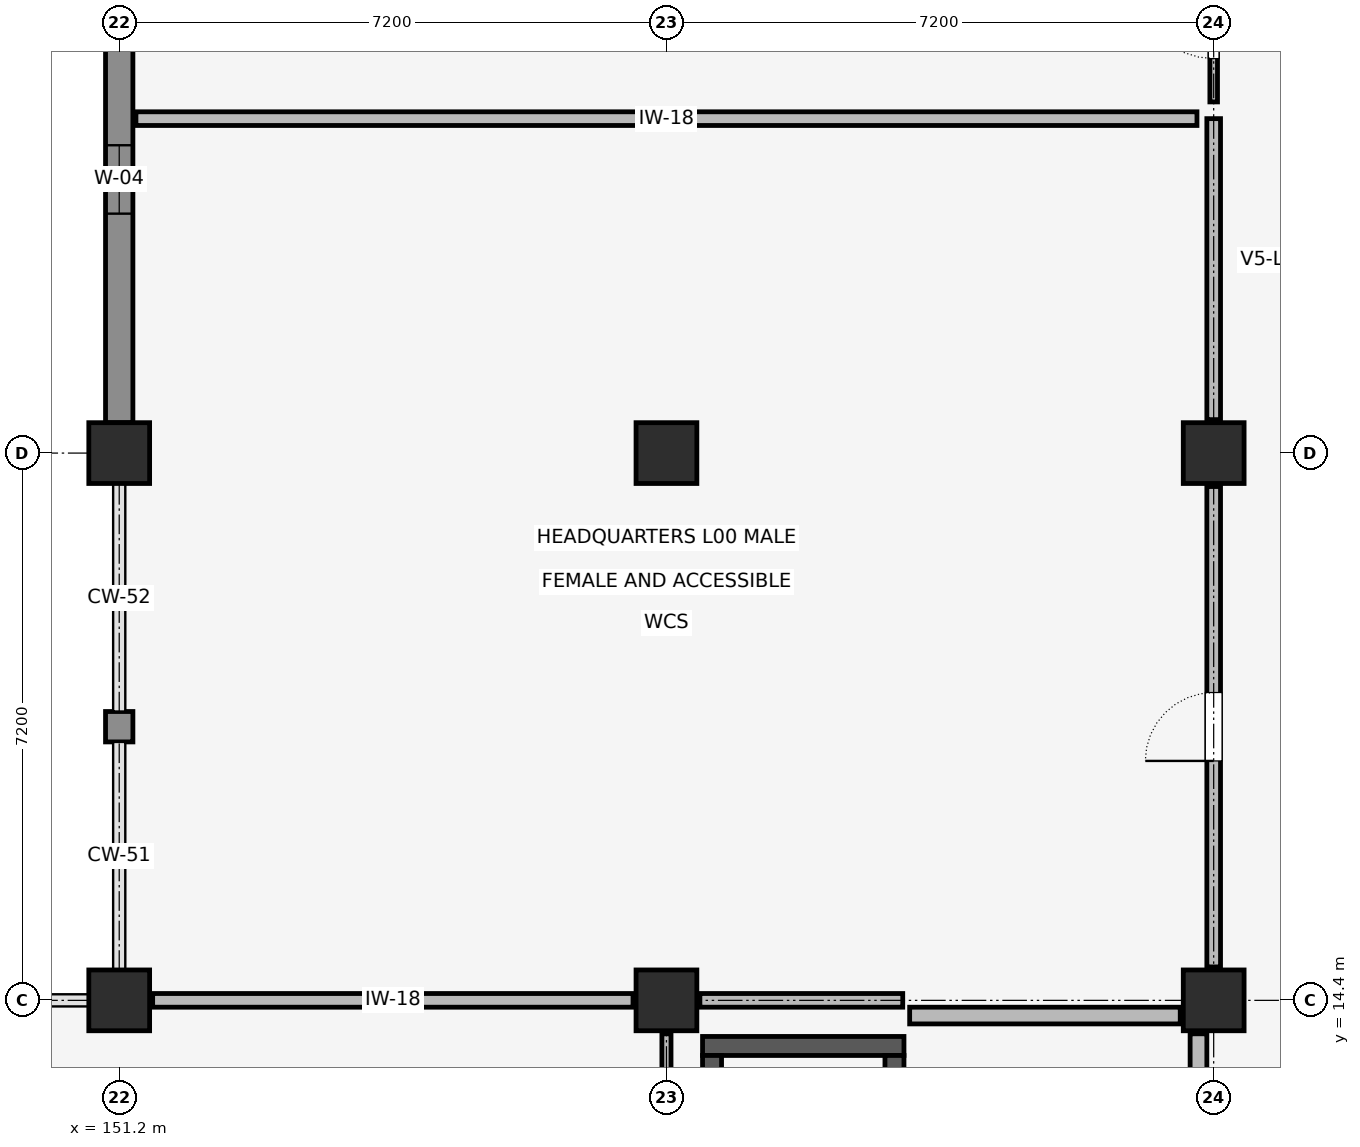
"""IFC4 building model, lengths in metres.
Left out: names, types, materials, properties, quantities, classifications, styles, units other than length and angle.
Written with IfcOpenShell. Run it as: python <this file> out.ifc"""

import sys

from ifc_helpers import new_model, si_unit, direction, frame, frame_2d, origin, origin_2d, place, context, subcontext, project, spatial, rectangle, extrude, element, fill, save


model = new_model("IFC4")
c1 = context("Model", 3, precision=1e-05, world=origin(), true_north=direction((0.0, 1.0)))
c2 = subcontext(c1, "Body", "Model", "MODEL_VIEW")
j1 = project(units=[si_unit("LENGTHUNIT", "METRE"), si_unit("PLANEANGLEUNIT", "RADIAN")], contexts=[c1])
p1 = place(None, origin())
s1 = spatial("IfcSite", under=j1, at=p1, CompositionType="ELEMENT")
p2 = place(p1, origin())
s2 = spatial("IfcBuilding", under=s1, at=p2, CompositionType="ELEMENT")
p3 = place(p2, origin())
s3 = spatial("IfcBuildingStorey", under=s2, at=p3, CompositionType="ELEMENT", Elevation=0.0)
for number, where, z_axis, x_axis in (
    (1, (151.2, 14.4, 0.0), (0.0, 0.0, 1.0), (1.0, 0.0, 0.0)),
    (2, (151.2, 21.6, 0.0), (0.0, 0.0, 1.0), (1.0, 0.0, 0.0)),
    (3, (158.4, 14.4, 0.0), (0.0, 0.0, 1.0), (1.0, 0.0, 0.0)),
    (4, (158.4, 21.6, 0.0), (0.0, 0.0, 1.0), (1.0, 0.0, 0.0)),
    (5, (165.6, 14.4, 0.0), (0.0, 0.0, 1.0), (1.0, 0.0, 0.0)),
    (6, (165.6, 21.6, 0.0), (0.0, 0.0, 1.0), (1.0, 0.0, 0.0)),
):
    element("IfcColumn", number, at=place(p3, frame(where, z_axis=z_axis, x_axis=x_axis)), inside=s3, PredefinedType="COLUMN", context=c2, shape_type="SweptSolid", body=[
        extrude(rectangle(XDim=0.8, YDim=0.8, at=origin_2d()), origin(), (0.0, 0.0, 1.0), 5.4),
    ])
p4 = place(p3, frame((158.875, 13.8, 0.0), z_axis=(0.0, 0.0, 1.0), x_axis=(1.0, 0.0, 0.0)))
e7 = element("IfcWall", 7, at=p4, inside=s3, PredefinedType="SHEAR", context=c2, shape_type="SweptSolid", body=[
    extrude(rectangle(XDim=2.65, YDim=0.25, at=frame_2d((1.325, 0.0))), origin(), (0.0, 0.0, 1.0), 5.15),
])
p5 = place(p3, frame((159.0, 10.925, 0.0), z_axis=(0.0, 0.0, 1.0), x_axis=(0.0, 1.0, 0.0)))
e8 = element("IfcWall", 8, at=p5, inside=s3, PredefinedType="SHEAR", context=c2, shape_type="SweptSolid", body=[
    extrude(rectangle(XDim=2.75, YDim=0.25, at=frame_2d((1.375, 0.0))), origin(), (0.0, 0.0, 1.0), 5.15),
])
p6 = place(p3, frame((161.4, 10.925, 0.0), z_axis=(0.0, 0.0, 1.0), x_axis=(0.0, 1.0, 0.0)))
e9 = element("IfcWall", 9, at=p6, inside=s3, PredefinedType="SHEAR", context=c2, shape_type="SweptSolid", body=[
    extrude(rectangle(XDim=2.75, YDim=0.25, at=frame_2d((1.375, 0.0))), origin(), (0.0, 0.0, 1.0), 5.15),
])
p7 = place(p6, frame((0.825, 0.0, 0.0)))
e10 = element("IfcOpeningElement", 10, at=p7, cuts=e9, PredefinedType="OPENING", context=c2, shape_type="SweptSolid", body=[
    extrude(rectangle(XDim=1.1, YDim=2.15, at=frame_2d((0.55, 1.075))), frame((0.0, 0.137, 0.0), z_axis=(0.0, -1.0, 0.0), x_axis=(1.0, 0.0, 0.0)), (0.0, 0.0, 1.0), 0.274),
])
p8 = place(p3, frame((151.2, 17.8, 0.0), z_axis=(0.0, 0.0, 1.0), x_axis=(0.0, 1.0, 0.0)))
e11 = element("IfcWall", 11, at=p8, inside=s3, PredefinedType="SOLIDWALL", context=c2, shape_type="SweptSolid", body=[
    extrude(rectangle(XDim=0.4, YDim=0.36, at=frame_2d((0.2, 0.0))), origin(), (0.0, 0.0, 1.0), 4.49),
])
p9 = place(p3, frame((151.2, 22.0, 0.0), z_axis=(0.0, 0.0, 1.0), x_axis=(0.0, 1.0, 0.0)))
e12 = element("IfcWall", 12, at=p9, inside=s3, PredefinedType="SOLIDWALL", context=c2, shape_type="SweptSolid", body=[
    extrude(rectangle(XDim=6.4, YDim=0.36, at=frame_2d((3.2, 0.0))), origin(), (0.0, 0.0, 1.0), 4.54),
])
p10 = place(p9, frame((2.75, 0.0, 0.85)))
e13 = element("IfcOpeningElement", 13, at=p10, cuts=e12, PredefinedType="OPENING", context=c2, shape_type="SweptSolid", body=[
    extrude(rectangle(XDim=0.9, YDim=2.0, at=frame_2d((0.45, 1.0))), frame((0.0, 0.192, 0.0), z_axis=(0.0, -1.0, 0.0), x_axis=(1.0, 0.0, 0.0)), (0.0, 0.0, 1.0), 0.384),
])
p11 = place(p3, frame((165.4, 9.2, 0.0), z_axis=(0.0, 0.0, 1.0), x_axis=(0.0, 1.0, 0.0)))
e14 = element("IfcWall", 14, at=p11, inside=s3, PredefinedType="STANDARD", context=c2, shape_type="SweptSolid", body=[
    extrude(rectangle(XDim=4.76, YDim=0.22, at=frame_2d((2.38, 0.0))), origin(), (0.0, 0.0, 1.0), 4.538),
])
p12 = place(p11, frame((1.78, 0.0, 0.0)))
e15 = element("IfcOpeningElement", 15, at=p12, cuts=e14, PredefinedType="OPENING", context=c2, shape_type="SweptSolid", body=[
    extrude(rectangle(XDim=1.2, YDim=2.2, at=frame_2d((0.6, 1.1))), frame((0.0, 0.122, 0.0), z_axis=(0.0, -1.0, 0.0), x_axis=(1.0, 0.0, 0.0)), (0.0, 0.0, 1.0), 0.244),
])
p13 = place(p3, frame((161.6, 14.2, 0.0), z_axis=(0.0, 0.0, 1.0), x_axis=(1.0, 0.0, 0.0)))
e16 = element("IfcWall", 16, at=p13, inside=s3, PredefinedType="STANDARD", context=c2, shape_type="SweptSolid", body=[
    extrude(rectangle(XDim=3.56, YDim=0.22, at=frame_2d((1.78, 0.0))), origin(), (0.0, 0.0, 1.0), 4.388),
])
p14 = place(p3, frame((158.4, 9.42, 0.0), z_axis=(0.0, 0.0, 1.0), x_axis=(0.0, 1.0, 0.0)))
e17 = element("IfcWall", 17, at=p14, inside=s3, PredefinedType="PARTITIONING", context=c2, shape_type="SweptSolid", body=[
    extrude(rectangle(XDim=4.54, YDim=0.12, at=frame_2d((2.27, 0.0))), origin(), (0.0, 0.0, 1.0), 4.488),
])
p15 = place(p3, frame((165.6, 14.84, 0.0), z_axis=(0.0, 0.0, 1.0), x_axis=(0.0, 1.0, 0.0)))
e18 = element("IfcWall", 18, at=p15, inside=s3, PredefinedType="PLUMBINGWALL", context=c2, shape_type="SweptSolid", body=[
    extrude(rectangle(XDim=6.32, YDim=0.18, at=frame_2d((3.16, 0.0))), origin(), (0.0, 0.0, 1.0), 4.488),
])
p16 = place(p15, frame((2.71, 0.0, 0.0)))
e19 = element("IfcOpeningElement", 19, at=p16, cuts=e18, PredefinedType="OPENING", context=c2, shape_type="SweptSolid", body=[
    extrude(rectangle(XDim=0.9, YDim=2.1, at=frame_2d((0.45, 1.05))), frame((0.0, 0.102, 0.0), z_axis=(0.0, -1.0, 0.0), x_axis=(1.0, 0.0, 0.0)), (0.0, 0.0, 1.0), 0.204),
])
p17 = place(p3, frame((165.6, 22.04, 0.0), z_axis=(0.0, 0.0, 1.0), x_axis=(0.0, 1.0, 0.0)))
e20 = element("IfcWall", 20, at=p17, inside=s3, PredefinedType="PLUMBINGWALL", context=c2, shape_type="SweptSolid", body=[
    extrude(rectangle(XDim=3.96, YDim=0.18, at=frame_2d((1.98, 0.0))), origin(), (0.0, 0.0, 1.0), 4.538),
])
p18 = place(p3, frame((151.64, 14.4, 0.0), z_axis=(0.0, 0.0, 1.0), x_axis=(1.0, 0.0, 0.0)))
e21 = element("IfcWall", 21, at=p18, inside=s3, PredefinedType="PLUMBINGWALL", context=c2, shape_type="SweptSolid", body=[
    extrude(rectangle(XDim=6.32, YDim=0.18, at=frame_2d((3.16, 0.0))), origin(), (0.0, 0.0, 1.0), 4.438),
])
p19 = place(p3, frame((158.84, 14.4, 0.0), z_axis=(0.0, 0.0, 1.0), x_axis=(1.0, 0.0, 0.0)))
e22 = element("IfcWall", 22, at=p19, inside=s3, PredefinedType="PLUMBINGWALL", context=c2, shape_type="SweptSolid", body=[
    extrude(rectangle(XDim=2.669, YDim=0.18, at=frame_2d((1.334, 0.0))), origin(), (0.0, 0.0, 1.0), 4.388),
])
p20 = place(p3, frame((151.42, 26.0, 0.0), z_axis=(0.0, 0.0, 1.0), x_axis=(1.0, 0.0, 0.0)))
e23 = element("IfcWall", 23, at=p20, inside=s3, PredefinedType="PLUMBINGWALL", context=c2, shape_type="SweptSolid", body=[
    extrude(rectangle(XDim=13.96, YDim=0.18, at=frame_2d((6.98, 0.0))), origin(), (0.0, 0.0, 1.0), 4.488),
])
p21 = place(p3, frame((165.6, 26.22, 0.0), z_axis=(0.0, 0.0, 1.0), x_axis=(0.0, 1.0, 0.0)))
e24 = element("IfcWall", 24, at=p21, inside=s3, PredefinedType="PARTITIONING", context=c2, shape_type="SweptSolid", body=[
    extrude(rectangle(XDim=2.14, YDim=0.1, at=frame_2d((1.07, 0.0))), origin(), (0.0, 0.0, 1.0), 4.538),
])
p22 = place(p21, frame((0.57, 0.0, 0.0)))
e25 = element("IfcOpeningElement", 25, at=p22, cuts=e24, PredefinedType="OPENING", context=c2, shape_type="SweptSolid", body=[
    extrude(rectangle(XDim=1.0, YDim=2.15, at=frame_2d((0.5, 1.075))), frame((0.0, 0.062, 0.0), z_axis=(0.0, -1.0, 0.0), x_axis=(1.0, 0.0, 0.0)), (0.0, 0.0, 1.0), 0.124),
])
p23 = place(p10, origin())
e26 = element("IfcWindow", 26, at=p23, inside=s3, PartitioningType="SINGLE_PANEL", PredefinedType="WINDOW", context=c2, shape_type="SweptSolid", body=[
    extrude(rectangle(XDim=0.9, YDim=2.0, at=frame_2d((0.45, 1.0))), frame((0.0, 0.03, 0.0), z_axis=(0.0, -1.0, 0.0), x_axis=(1.0, 0.0, 0.0)), (0.0, 0.0, 1.0), 0.06),
])
fill(e13, e26)
p24 = place(p16, origin())
e27 = element("IfcDoor", 27, at=p24, inside=s3, OperationType="SINGLE_SWING_LEFT", PredefinedType="DOOR", context=c2, shape_type="SweptSolid", body=[
    extrude(rectangle(XDim=0.9, YDim=2.1, at=frame_2d((0.45, 1.05))), frame((0.0, 0.025, 0.0), z_axis=(0.0, -1.0, 0.0), x_axis=(1.0, 0.0, 0.0)), (0.0, 0.0, 1.0), 0.05),
])
fill(e19, e27)
p25 = place(p22, origin())
e28 = element("IfcDoor", 28, at=p25, inside=s3, OperationType="SINGLE_SWING_RIGHT", PredefinedType="DOOR", context=c2, shape_type="SweptSolid", body=[
    extrude(rectangle(XDim=1.0, YDim=2.15, at=frame_2d((0.5, 1.075))), frame((0.0, 0.025, 0.0), z_axis=(0.0, -1.0, 0.0), x_axis=(1.0, 0.0, 0.0)), (0.0, 0.0, 1.0), 0.05),
])
fill(e25, e28)
save(model, sys.argv[1])
